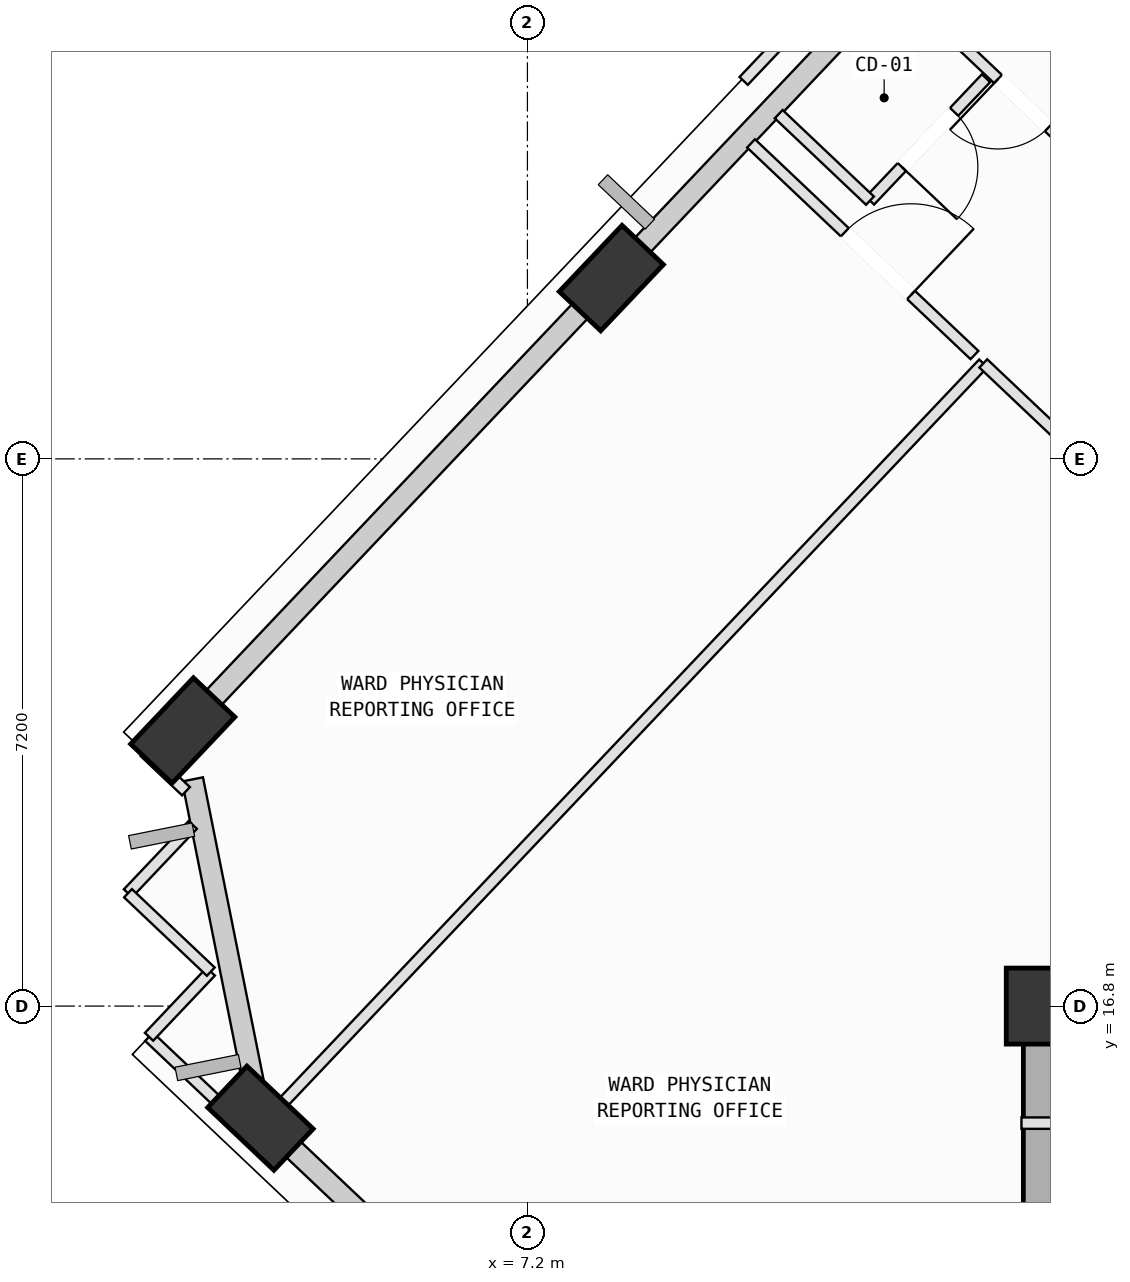
"""IFC4 building model, lengths in metres.
Left out: names, types, materials, properties, quantities, classifications, styles, units other than length and angle.
Written with IfcOpenShell. Run it as: python <this file> out.ifc"""

import sys

from ifc_helpers import new_model, si_unit, direction, frame, frame_2d, origin, origin_2d, place, context, subcontext, project, spatial, rectangle, extrude, element, fill, save


model = new_model("IFC4")
c1 = context("Model", 3, precision=1e-05, world=origin(), true_north=direction((0.0, 1.0)))
c2 = subcontext(c1, "Body", "Model", "MODEL_VIEW")
j1 = project(units=[si_unit("LENGTHUNIT", "METRE"), si_unit("PLANEANGLEUNIT", "RADIAN")], contexts=[c1])
p1 = place(None, origin())
s1 = spatial("IfcSite", under=j1, at=p1, CompositionType="ELEMENT")
p2 = place(p1, origin())
s2 = spatial("IfcBuilding", under=s1, at=p2, CompositionType="ELEMENT")
p3 = place(p2, frame((0.0, 0.0, 223.2)))
s3 = spatial("IfcBuildingStorey", under=s2, at=p3, CompositionType="ELEMENT", Elevation=223.2)
p4 = place(p3, frame((14.0, 16.8, 0.0), z_axis=(0.0, 0.0, 1.0), x_axis=(1.0, 0.0, 0.0)))
e1 = element("IfcColumn", 1, at=p4, inside=s3, PredefinedType="COLUMN", context=c2, shape_type="SweptSolid", body=[
    extrude(rectangle(XDim=1.0, YDim=1.0, at=origin_2d()), origin(), (0.0, 0.0, 1.0), 4.0),
])
p5 = place(p3, frame((8.304, 26.379, 0.002), z_axis=(-0.005589626028, -0.10431943358, 0.994528135277), x_axis=(0.725366989524, 0.684171567726, 0.075841917333)))
e2 = element("IfcColumn", 2, at=p5, inside=s3, PredefinedType="COLUMN", context=c2, shape_type="SweptSolid", body=[
    extrude(rectangle(XDim=1.2, YDim=0.75, at=origin_2d()), origin(), (0.0, 0.0, 1.0), 4.018),
])
p6 = place(p3, frame((2.665, 20.426, 0.002), z_axis=(0.019023806592, -0.126986938273, 0.991721943032), x_axis=(0.573464567353, 0.813909565953, 0.093218069283)))
e3 = element("IfcColumn", 3, at=p6, inside=s3, PredefinedType="COLUMN", context=c2, shape_type="SweptSolid", body=[
    extrude(rectangle(XDim=1.2, YDim=0.75, at=origin_2d()), origin(), (0.0, 0.0, 1.0), 4.03),
])
p7 = place(p3, frame((3.687, 15.325, 0.002), z_axis=(0.039983086143, -0.122675377938, 0.991641116771), x_axis=(-0.901569869331, 0.4234359127, 0.088734427086)))
e4 = element("IfcColumn", 4, at=p7, inside=s3, PredefinedType="COLUMN", context=c2, shape_type="SweptSolid", body=[
    extrude(rectangle(XDim=1.2, YDim=0.75, at=origin_2d()), origin(), (0.0, 0.0, 1.0), 4.03),
])
p8 = place(p3, frame((8.451, 26.534, 0.0), z_axis=(0.0, 0.0, 1.0), x_axis=(0.687701834899, 0.725993241206, 0.0)))
e5 = element("IfcWall", 5, at=p8, inside=s3, PredefinedType="SOLIDWALL", context=c2, shape_type="SweptSolid", body=[
    extrude(rectangle(XDim=7.434, YDim=0.28, at=frame_2d((3.717, 0.0))), origin(), (0.0, 0.0, 1.0), 3.265),
])
p9 = place(p3, frame((2.79, 20.558, 0.0), z_axis=(0.0, 0.0, 1.0), x_axis=(0.687733790789, 0.725962969446, 0.0)))
e6 = element("IfcWall", 6, at=p9, inside=s3, PredefinedType="SOLIDWALL", context=c2, shape_type="SweptSolid", body=[
    extrude(rectangle(XDim=7.485, YDim=0.28, at=frame_2d((3.742, 0.0))), origin(), (0.0, 0.0, 1.0), 3.265),
])
p10 = place(p3, frame((3.66, 15.461, 0.0), z_axis=(0.0, 0.0, 1.0), x_axis=(-0.196510213366, 0.980501777685, 0.0)))
e7 = element("IfcWall", 7, at=p10, inside=s3, PredefinedType="SOLIDWALL", context=c2, shape_type="SweptSolid", body=[
    extrude(rectangle(XDim=4.408, YDim=0.28, at=frame_2d((2.204, 0.0))), origin(), (0.0, 0.0, 1.0), 3.265),
])
p11 = place(p3, frame((8.36, 10.899, 0.0), z_axis=(0.0, 0.0, 1.0), x_axis=(-0.725963687111, 0.68773303323, 0.0)))
e8 = element("IfcWall", 8, at=p11, inside=s3, PredefinedType="SOLIDWALL", context=c2, shape_type="SweptSolid", body=[
    extrude(rectangle(XDim=5.83, YDim=0.28, at=frame_2d((2.915, 0.0))), origin(), (0.0, 0.0, 1.0), 3.265),
])
p12 = place(p11, frame((1.911, 0.0, 0.75)))
e9 = element("IfcOpeningElement", 9, at=p12, cuts=e8, PredefinedType="OPENING", context=c2, shape_type="SweptSolid", body=[
    extrude(rectangle(XDim=2.0, YDim=1.95, at=frame_2d((1.0, 0.975))), frame((0.0, 0.15, 0.0), z_axis=(0.0, -1.0, 0.0), x_axis=(1.0, 0.0, 0.0)), (0.0, 0.0, 1.0), 0.3),
])
p13 = place(p3, frame((14.0, 16.8, 0.0), z_axis=(0.0, 0.0, 1.0), x_axis=(0.0, -1.0, 0.0)))
e10 = element("IfcWall", 10, at=p13, inside=s3, PredefinedType="SHEAR", context=c2, shape_type="SweptSolid", body=[
    extrude(rectangle(XDim=9.0, YDim=0.55, at=frame_2d((4.5, 0.0))), origin(), (0.0, 0.0, 1.0), 3.78),
])
p14 = place(p3, frame((14.82, 15.26, 0.0), z_axis=(0.0, 0.0, 1.0), x_axis=(-1.0, 0.0, 0.0)))
e11 = element("IfcWall", 11, at=p14, inside=s3, PredefinedType="PARTITIONING", context=c2, shape_type="SweptSolid", body=[
    extrude(rectangle(XDim=1.12, YDim=0.15, at=frame_2d((0.56, 0.0))), origin(), (0.0, 0.0, 1.0), 3.78),
])
p15 = place(p3, frame((3.97, 14.742, 0.0), z_axis=(0.0, 0.0, 1.0), x_axis=(-0.726592423793, 0.687068737236, 0.0)))
e12 = element("IfcWall", 12, at=p15, inside=s3, PredefinedType="PARTITIONING", context=c2, shape_type="SweptSolid", body=[
    extrude(rectangle(XDim=0.531, YDim=0.15, at=frame_2d((0.266, 0.0))), origin(), (0.0, 0.0, 1.0), 3.265),
])
p16 = place(p3, frame((3.584, 15.107, 0.0), z_axis=(0.0, 0.0, 1.0), x_axis=(0.687707348385, 0.72598801848, 0.0)))
e13 = element("IfcWall", 13, at=p16, inside=s3, PredefinedType="PARTITIONING", context=c2, shape_type="SweptSolid", body=[
    extrude(rectangle(XDim=13.98, YDim=0.15, at=frame_2d((6.99, 0.0))), origin(), (0.0, 0.0, 1.0), 3.78),
])
p17 = place(p3, frame((13.198, 25.256, 0.0), z_axis=(0.0, 0.0, 1.0), x_axis=(0.725968723938, -0.687727716371, 0.0)))
e14 = element("IfcWall", 14, at=p17, inside=s3, PredefinedType="PARTITIONING", context=c2, shape_type="SweptSolid", body=[
    extrude(rectangle(XDim=6.799, YDim=0.15, at=frame_2d((3.4, 0.0))), origin(), (0.0, 0.0, 1.0), 3.78),
])
p18 = place(p17, frame((2.8, 0.0, 0.0)))
e15 = element("IfcOpeningElement", 15, at=p18, cuts=e14, PredefinedType="OPENING", context=c2, shape_type="SweptSolid", body=[
    extrude(rectangle(XDim=1.2, YDim=2.15, at=frame_2d((0.6, 1.075))), frame((0.0, 0.085, 0.0), z_axis=(0.0, -1.0, 0.0), x_axis=(1.0, 0.0, 0.0)), (0.0, 0.0, 1.0), 0.17),
])
p19 = place(p3, frame((1.945, 18.285, 0.0), z_axis=(0.0, 0.0, 1.0), x_axis=(0.687832109073, 0.725869815964, 0.0)))
e16 = element("IfcWall", 16, at=p19, inside=s3, PredefinedType="PARTITIONING", context=c2, shape_type="SweptSolid", body=[
    extrude(rectangle(XDim=1.239, YDim=0.15, at=frame_2d((0.619, 0.0))), origin(), (0.0, 0.0, 1.0), 3.78),
])
p20 = place(p3, frame((2.708, 19.627, 0.0), z_axis=(0.0, 0.0, 1.0), x_axis=(-0.725388799177, 0.688339371262, 0.0)))
e17 = element("IfcWall", 17, at=p20, inside=s3, PredefinedType="PARTITIONING", context=c2, shape_type="SweptSolid", body=[
    extrude(rectangle(XDim=0.751, YDim=0.15, at=frame_2d((0.375, 0.0))), origin(), (0.0, 0.0, 1.0), 3.78),
])
p21 = place(p3, frame((2.163, 20.144, 0.0), z_axis=(0.0, 0.0, 1.0), x_axis=(0.687652052217, 0.726040394938, 0.0)))
e18 = element("IfcWall", 18, at=p21, inside=s3, PredefinedType="PARTITIONING", context=c2, shape_type="SweptSolid", body=[
    extrude(rectangle(XDim=0.731, YDim=0.15, at=frame_2d((0.366, 0.0))), origin(), (0.0, 0.0, 1.0), 3.78),
])
p22 = place(p3, frame((7.814, 26.108, 0.0), z_axis=(0.0, 0.0, 1.0), x_axis=(0.687409433175, 0.726270108969, 0.0)))
e19 = element("IfcWall", 19, at=p22, inside=s3, PredefinedType="PARTITIONING", context=c2, shape_type="SweptSolid", body=[
    extrude(rectangle(XDim=0.748, YDim=0.15, at=frame_2d((0.374, 0.0))), origin(), (0.0, 0.0, 1.0), 3.78),
])
p23 = place(p3, frame((10.142, 28.151, 0.0), z_axis=(0.0, 0.0, 1.0), x_axis=(0.725989119773, -0.687706185788, 0.0)))
e20 = element("IfcWall", 20, at=p23, inside=s3, PredefinedType="PARTITIONING", context=c2, shape_type="SweptSolid", body=[
    extrude(rectangle(XDim=4.05, YDim=0.15, at=frame_2d((2.025, 0.0))), origin(), (0.0, 0.0, 1.0), 3.78),
])
p24 = place(p23, frame((1.7, 0.0, 0.0)))
e21 = element("IfcOpeningElement", 21, at=p24, cuts=e20, PredefinedType="OPENING", context=c2, shape_type="SweptSolid", body=[
    extrude(rectangle(XDim=1.2, YDim=2.15, at=frame_2d((0.6, 1.075))), frame((0.0, 0.085, 0.0), z_axis=(0.0, -1.0, 0.0), x_axis=(1.0, 0.0, 0.0)), (0.0, 0.0, 1.0), 0.17),
])
p25 = place(p3, frame((3.467, 15.217, 0.0), z_axis=(0.0, 0.0, 1.0), x_axis=(-0.726135984847, 0.687551111926, 0.0)))
e22 = element("IfcWall", 22, at=p25, inside=s3, PredefinedType="PARTITIONING", context=c2, shape_type="SweptSolid", body=[
    extrude(rectangle(XDim=1.715, YDim=0.15, at=frame_2d((0.857, 0.0))), origin(), (0.0, 0.0, 1.0), 3.78),
])
p26 = place(p3, frame((2.222, 16.396, 0.0), z_axis=(0.0, 0.0, 1.0), x_axis=(0.687824949472, 0.725876600314, 0.0)))
e23 = element("IfcWall", 23, at=p26, inside=s3, PredefinedType="PARTITIONING", context=c2, shape_type="SweptSolid", body=[
    extrude(rectangle(XDim=1.181, YDim=0.15, at=frame_2d((0.59, 0.0))), origin(), (0.0, 0.0, 1.0), 3.78),
])
p27 = place(p3, frame((3.034, 17.253, 0.0), z_axis=(0.0, 0.0, 1.0), x_axis=(-0.725811549819, 0.687893592171, 0.0)))
e24 = element("IfcWall", 24, at=p27, inside=s3, PredefinedType="PARTITIONING", context=c2, shape_type="SweptSolid", body=[
    extrude(rectangle(XDim=1.5, YDim=0.15, at=frame_2d((0.75, 0.0))), origin(), (0.0, 0.0, 1.0), 3.78),
])
p28 = place(p3, frame((15.35, 27.143, 0.0), z_axis=(0.0, 0.0, 1.0), x_axis=(-0.726077402079, 0.687612977037, 0.0)))
e25 = element("IfcWall", 25, at=p28, inside=s3, PredefinedType="PARTITIONING", context=c2, shape_type="SweptSolid", body=[
    extrude(rectangle(XDim=4.475, YDim=0.15, at=frame_2d((2.237, 0.0))), origin(), (0.0, 0.0, 1.0), 3.78),
])
p29 = place(p28, frame((1.777, 0.0, 0.0)))
e26 = element("IfcOpeningElement", 26, at=p29, cuts=e25, PredefinedType="OPENING", context=c2, shape_type="SweptSolid", body=[
    extrude(rectangle(XDim=0.92, YDim=2.1, at=frame_2d((0.46, 1.05))), frame((0.0, 0.085, 0.0), z_axis=(0.0, -1.0, 0.0), x_axis=(1.0, 0.0, 0.0)), (0.0, 0.0, 1.0), 0.17),
])
p30 = place(p3, frame((13.234, 29.009, 0.0), z_axis=(0.0, 0.0, 1.0), x_axis=(-0.6878788724, -0.725825500314, 0.0)))
e27 = element("IfcWall", 27, at=p30, inside=s3, PredefinedType="PARTITIONING", context=c2, shape_type="SweptSolid", body=[
    extrude(rectangle(XDim=2.22, YDim=0.15, at=frame_2d((1.11, 0.0))), origin(), (0.0, 0.0, 1.0), 3.78),
])
p31 = place(p30, frame((0.61, 0.0, 0.0)))
e28 = element("IfcOpeningElement", 28, at=p31, cuts=e27, PredefinedType="OPENING", context=c2, shape_type="SweptSolid", body=[
    extrude(rectangle(XDim=1.0, YDim=2.12, at=frame_2d((0.5, 1.06))), frame((0.0, 0.085, 0.0), z_axis=(0.0, -1.0, 0.0), x_axis=(1.0, 0.0, 0.0)), (0.0, 0.0, 1.0), 0.17),
])
p32 = place(p3, frame((11.707, 27.398, 0.0), z_axis=(0.0, 0.0, 1.0), x_axis=(-0.725886759705, 0.687814227888, 0.0)))
e29 = element("IfcWall", 29, at=p32, inside=s3, PredefinedType="PARTITIONING", context=c2, shape_type="SweptSolid", body=[
    extrude(rectangle(XDim=1.655, YDim=0.15, at=frame_2d((0.827, 0.0))), origin(), (0.0, 0.0, 1.0), 3.78),
])
p33 = place(p3, frame((10.045, 28.973, 0.0), z_axis=(0.0, 0.0, 1.0), x_axis=(0.687707621898, 0.725987759389, 0.0)))
e30 = element("IfcWall", 30, at=p33, inside=s3, PredefinedType="PARTITIONING", context=c2, shape_type="SweptSolid", body=[
    extrude(rectangle(XDim=5.67, YDim=0.15, at=frame_2d((2.835, 0.0))), origin(), (0.0, 0.0, 1.0), 3.78),
])
p34 = place(p24, origin())
e31 = element("IfcDoor", 31, at=p34, inside=s3, OperationType="SINGLE_SWING_RIGHT", PredefinedType="DOOR", context=c2, shape_type="SweptSolid", body=[
    extrude(rectangle(XDim=1.2, YDim=2.15, at=frame_2d((0.6, 1.075))), frame((0.0, 0.025, 0.0), z_axis=(0.0, -1.0, 0.0), x_axis=(1.0, 0.0, 0.0)), (0.0, 0.0, 1.0), 0.05),
])
fill(e21, e31)
p35 = place(p29, origin())
e32 = element("IfcDoor", 32, at=p35, inside=s3, OperationType="SINGLE_SWING_RIGHT", PredefinedType="DOOR", context=c2, shape_type="SweptSolid", body=[
    extrude(rectangle(XDim=0.92, YDim=2.1, at=frame_2d((0.46, 1.05))), frame((0.0, 0.025, 0.0), z_axis=(0.0, -1.0, 0.0), x_axis=(1.0, 0.0, 0.0)), (0.0, 0.0, 1.0), 0.05),
])
fill(e26, e32)
p36 = place(p31, origin())
e33 = element("IfcDoor", 33, at=p36, inside=s3, OperationType="SINGLE_SWING_RIGHT", PredefinedType="DOOR", context=c2, shape_type="SweptSolid", body=[
    extrude(rectangle(XDim=1.0, YDim=2.12, at=frame_2d((0.5, 1.06))), frame((0.0, 0.025, 0.0), z_axis=(0.0, -1.0, 0.0), x_axis=(1.0, 0.0, 0.0)), (0.0, 0.0, 1.0), 0.05),
])
fill(e28, e33)
save(model, sys.argv[1])
